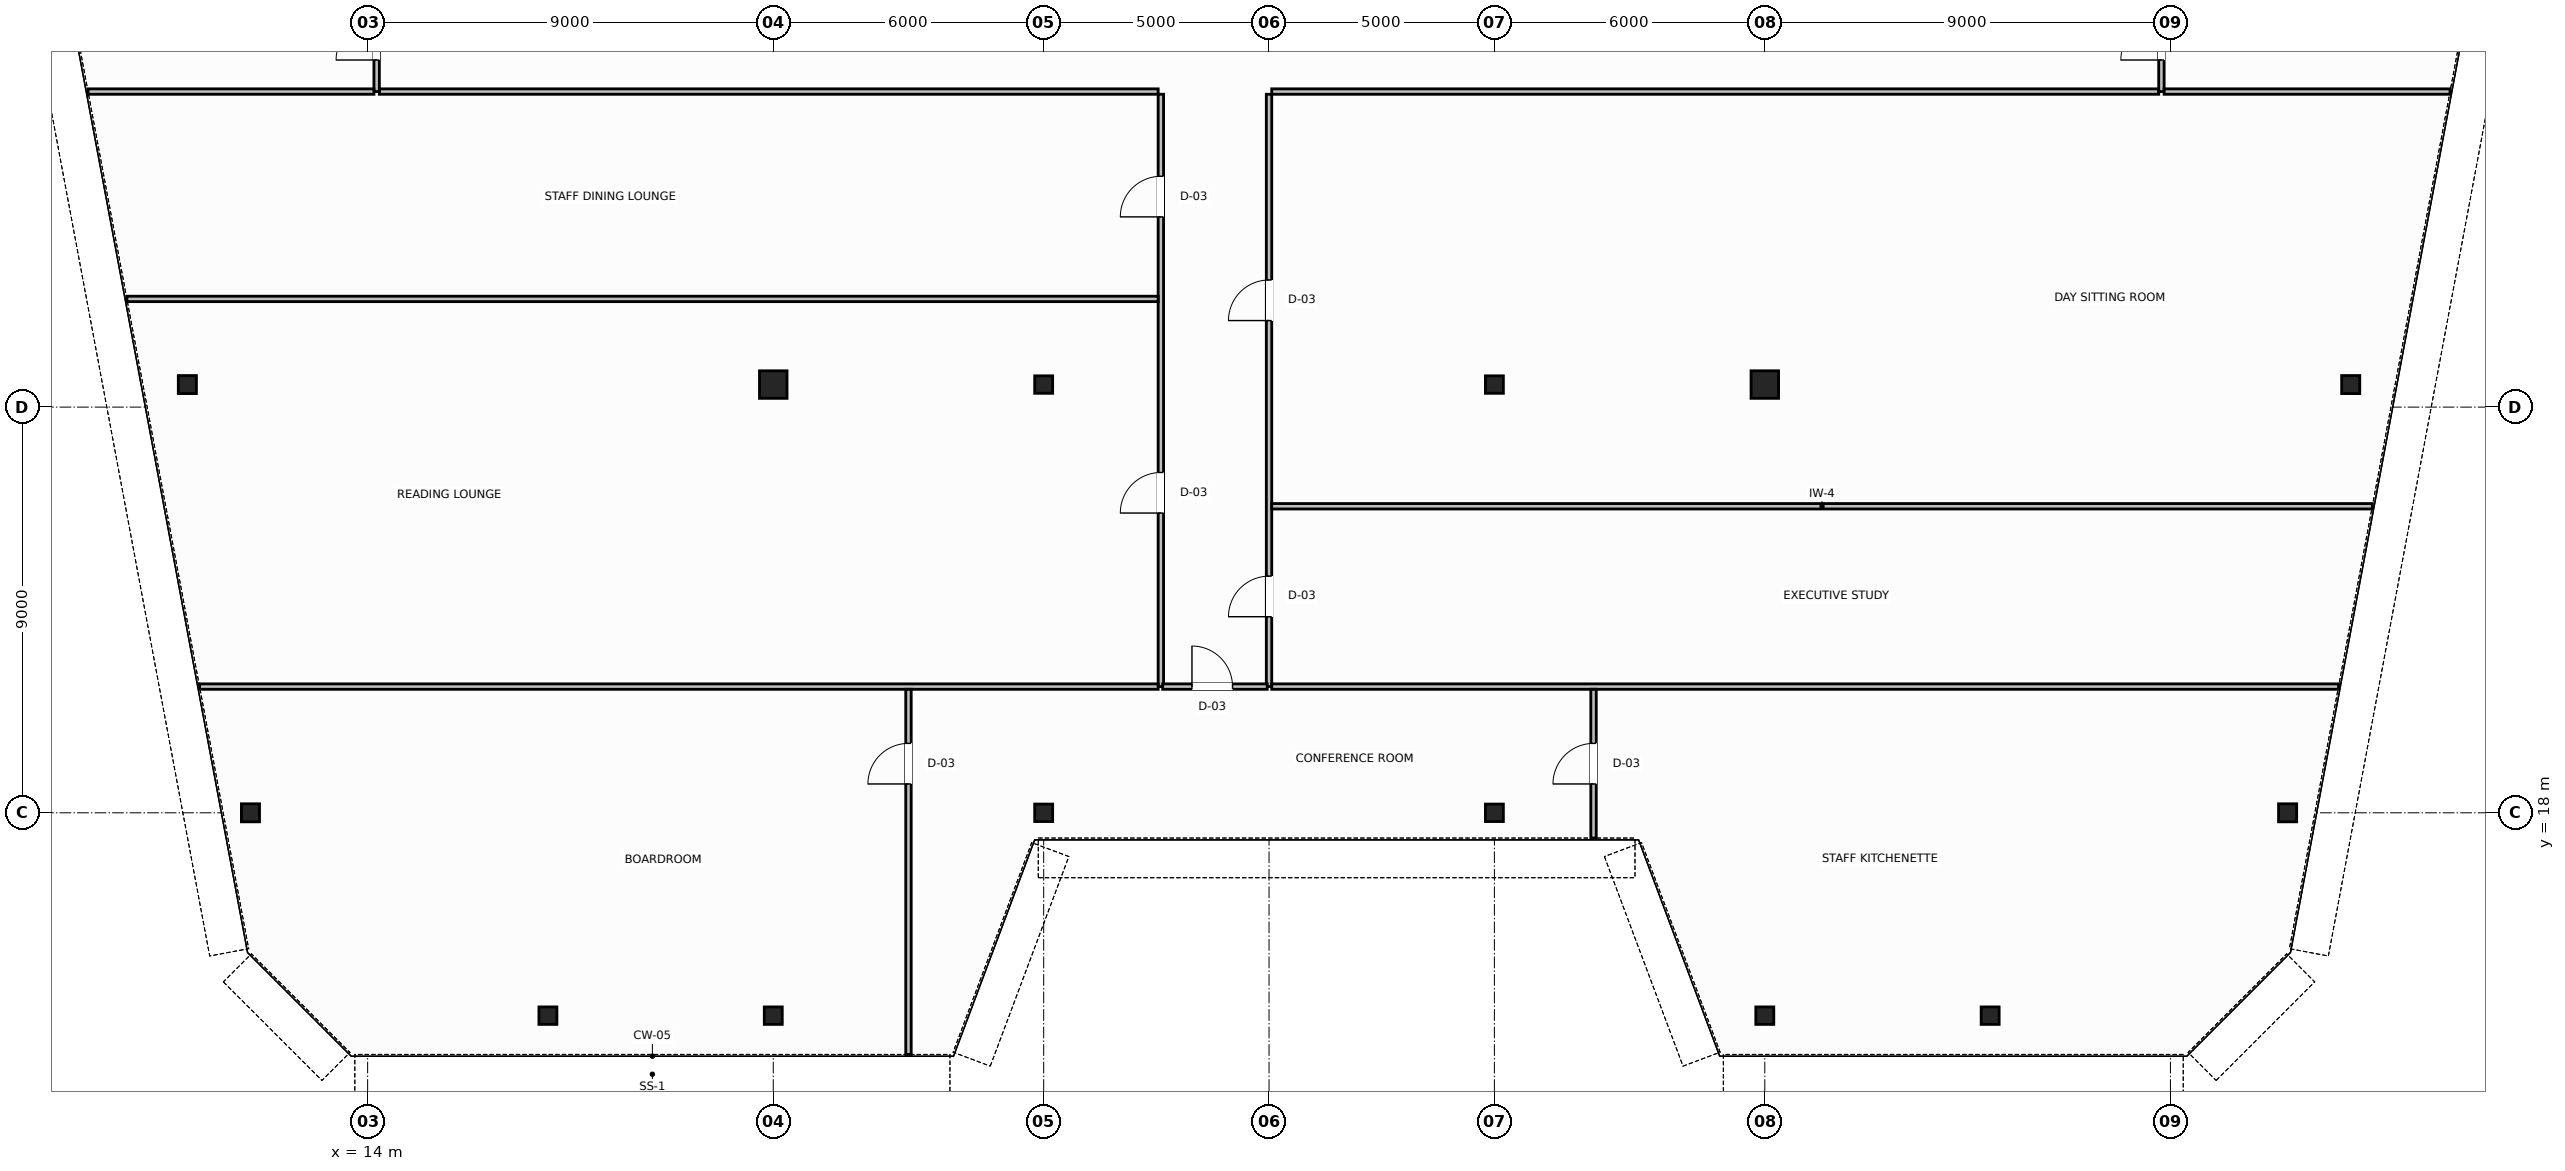
"""IFC4 building model, lengths in metres.
Left out: names, types, materials, properties, quantities, classifications, styles, units other than length and angle.
Written with IfcOpenShell. Run it as: python <this file> out.ifc"""

import sys

from ifc_helpers import new_model, si_unit, direction, frame, frame_2d, origin, origin_2d, place, context, subcontext, project, spatial, rectangle, hollow_circle, i_section, extrude, source, transform, mapped, element, fill, save


model = new_model("IFC4")
c1 = context("Model", 3, precision=1e-05, world=origin(), true_north=direction((0.0, 1.0)))
c2 = subcontext(c1, "Body", "Model", "MODEL_VIEW")
j1 = project(units=[si_unit("LENGTHUNIT", "METRE"), si_unit("PLANEANGLEUNIT", "RADIAN")], contexts=[c1])
p1 = place(None, origin())
s1 = spatial("IfcSite", under=j1, at=p1, CompositionType="ELEMENT")
p2 = place(p1, origin())
s2 = spatial("IfcBuilding", under=s1, at=p2, CompositionType="ELEMENT")
p3 = place(p2, frame((0.0, 0.0, 276.4)))
s3 = spatial("IfcBuildingStorey", under=s2, at=p3, CompositionType="ELEMENT", Elevation=276.4)
m1 = source(origin(), c2, "Body", "SweptSolid", [
    extrude(i_section(OverallWidth=0.401, OverallDepth=0.399, WebThickness=0.025, FlangeThickness=0.035, FilletRadius=0.015, at=origin_2d()), origin(), (0.0, 0.0, 1.0), 3.8),
])
for number, where, z_axis, x_axis in (
    (1, (10.0, 27.5, 0.0), (0.0, 0.0, 1.0), (1.0, 0.0, 0.0)),
    (2, (11.4, 18.0, 0.0), (0.0, 0.0, 1.0), (1.0, 0.0, 0.0)),
    (3, (58.0, 27.5, 0.0), (0.0, 0.0, 1.0), (1.0, 0.0, 0.0)),
    (4, (56.6, 18.0, 0.0), (0.0, 0.0, 1.0), (1.0, 0.0, 0.0)),
):
    element("IfcColumn", number, at=place(p3, frame(where, z_axis=z_axis, x_axis=x_axis)), inside=s3, PredefinedType="COLUMN", context=c2, shape_type="MappedRepresentation", body=[
        mapped(m1, transform((0.0, 0.0, 0.0), scale=1.0)),
    ])
m2 = source(origin(), c2, "Body", "SweptSolid", [
    extrude(hollow_circle(Radius=0.305, WallThickness=0.03, at=origin_2d()), origin(), (0.0, 0.0, 1.0), 3.8),
])
p4 = place(p3, frame((23.0, 27.5, 0.0), z_axis=(0.0, 0.0, 1.0), x_axis=(1.0, 0.0, 0.0)))
e5 = element("IfcColumn", 5, at=p4, inside=s3, PredefinedType="COLUMN", context=c2, shape_type="MappedRepresentation", body=[
    mapped(m2, transform((0.0, 0.0, 0.0), scale=1.0)),
])
m3 = source(origin(), c2, "Body", "SweptSolid", [
    extrude(i_section(OverallWidth=0.398, OverallDepth=0.387, WebThickness=0.021, FlangeThickness=0.029, FilletRadius=0.015, at=origin_2d()), origin(), (0.0, 0.0, 1.0), 3.8),
])
for number, where, z_axis, x_axis in (
    (6, (29.0, 27.5, 0.0), (0.0, 0.0, 1.0), (1.0, 0.0, 0.0)),
    (7, (39.0, 27.5, 0.0), (0.0, 0.0, 1.0), (1.0, 0.0, 0.0)),
):
    element("IfcColumn", number, at=place(p3, frame(where, z_axis=z_axis, x_axis=x_axis)), inside=s3, PredefinedType="COLUMN", context=c2, shape_type="MappedRepresentation", body=[
        mapped(m3, transform((0.0, 0.0, 0.0), scale=1.0)),
    ])
p5 = place(p3, frame((45.0, 27.5, 0.0), z_axis=(0.0, 0.0, 1.0), x_axis=(1.0, 0.0, 0.0)))
e8 = element("IfcColumn", 8, at=p5, inside=s3, PredefinedType="COLUMN", context=c2, shape_type="MappedRepresentation", body=[
    mapped(m2, transform((0.0, 0.0, 0.0), scale=1.0)),
])
for number, where, z_axis, x_axis in (
    (9, (18.0, 13.5, 0.0), (0.0, 0.0, 1.0), (1.0, 0.0, 0.0)),
    (10, (23.0, 13.5, 0.0), (0.0, 0.0, 1.0), (1.0, 0.0, 0.0)),
    (11, (29.0, 18.0, 0.0), (0.0, 0.0, 1.0), (1.0, 0.0, 0.0)),
    (12, (39.0, 18.0, 0.0), (0.0, 0.0, 1.0), (1.0, 0.0, 0.0)),
    (13, (45.0, 13.5, 0.0), (0.0, 0.0, 1.0), (1.0, 0.0, 0.0)),
    (14, (50.0, 13.5, 0.0), (0.0, 0.0, 1.0), (1.0, 0.0, 0.0)),
):
    element("IfcColumn", number, at=place(p3, frame(where, z_axis=z_axis, x_axis=x_axis)), inside=s3, PredefinedType="COLUMN", context=c2, shape_type="MappedRepresentation", body=[
        mapped(m3, transform((0.0, 0.0, 0.0), scale=1.0)),
    ])
p6 = place(p3, frame((14.26, 34.0, 0.0), z_axis=(0.0, 0.0, 1.0), x_axis=(1.0, 0.0, 0.0)))
e15 = element("IfcWall", 15, at=p6, inside=s3, PredefinedType="PARTITIONING", context=c2, shape_type="SweptSolid", body=[
    extrude(rectangle(XDim=17.28, YDim=0.12, at=frame_2d((8.64, 0.0))), origin(), (0.0, 0.0, 1.0), 3.21),
])
p7 = place(p3, frame((34.06, 34.0, 0.0), z_axis=(0.0, 0.0, 1.0), x_axis=(1.0, 0.0, 0.0)))
e16 = element("IfcWall", 16, at=p7, inside=s3, PredefinedType="PARTITIONING", context=c2, shape_type="SweptSolid", body=[
    extrude(rectangle(XDim=19.68, YDim=0.12, at=frame_2d((9.84, 0.0))), origin(), (0.0, 0.0, 1.0), 3.21),
])
p8 = place(p3, frame((14.2, 34.0, 0.0), z_axis=(0.0, 0.0, 1.0), x_axis=(0.0, 1.0, 0.0)))
e17 = element("IfcWall", 17, at=p8, inside=s3, PredefinedType="PARTITIONING", context=c2, shape_type="SweptSolid", body=[
    extrude(rectangle(XDim=2.44, YDim=0.12, at=frame_2d((1.22, 0.0))), origin(), (0.0, 0.0, 1.0), 3.58),
])
p9 = place(p8, frame((0.7, 0.0, 0.0)))
e18 = element("IfcOpeningElement", 18, at=p9, cuts=e17, PredefinedType="OPENING", context=c2, shape_type="SweptSolid", body=[
    extrude(rectangle(XDim=0.9, YDim=2.15, at=frame_2d((0.45, 1.075))), frame((0.0, 0.07, 0.0), z_axis=(0.0, -1.0, 0.0), x_axis=(1.0, 0.0, 0.0)), (0.0, 0.0, 1.0), 0.14),
])
p10 = place(p3, frame((53.8, 34.0, 0.0), z_axis=(0.0, 0.0, 1.0), x_axis=(0.0, 1.0, 0.0)))
e19 = element("IfcWall", 19, at=p10, inside=s3, PredefinedType="PARTITIONING", context=c2, shape_type="SweptSolid", body=[
    extrude(rectangle(XDim=2.44, YDim=0.12, at=frame_2d((1.22, 0.0))), origin(), (0.0, 0.0, 1.0), 3.58),
])
p11 = place(p10, frame((0.7, 0.0, 0.0)))
e20 = element("IfcOpeningElement", 20, at=p11, cuts=e19, PredefinedType="OPENING", context=c2, shape_type="SweptSolid", body=[
    extrude(rectangle(XDim=0.9, YDim=2.15, at=frame_2d((0.45, 1.075))), frame((0.0, 0.07, 0.0), z_axis=(0.0, -1.0, 0.0), x_axis=(1.0, 0.0, 0.0)), (0.0, 0.0, 1.0), 0.14),
])
p12 = place(p3, frame((31.6, 20.8, 0.0), z_axis=(0.0, 0.0, 1.0), x_axis=(0.0, 1.0, 0.0)))
e21 = element("IfcWall", 21, at=p12, inside=s3, PredefinedType="PARTITIONING", context=c2, shape_type="SweptSolid", body=[
    extrude(rectangle(XDim=13.14, YDim=0.12, at=frame_2d((6.57, 0.0))), origin(), (0.0, 0.0, 1.0), 3.58),
])
p13 = place(p12, frame((3.85, 0.0, 0.0)))
e22 = element("IfcOpeningElement", 22, at=p13, cuts=e21, PredefinedType="OPENING", context=c2, shape_type="SweptSolid", body=[
    extrude(rectangle(XDim=0.9, YDim=2.15, at=frame_2d((0.45, 1.075))), frame((0.0, 0.07, 0.0), z_axis=(0.0, -1.0, 0.0), x_axis=(1.0, 0.0, 0.0)), (0.0, 0.0, 1.0), 0.14),
])
p14 = place(p12, frame((10.42, 0.0, 0.0)))
e23 = element("IfcOpeningElement", 23, at=p14, cuts=e21, PredefinedType="OPENING", context=c2, shape_type="SweptSolid", body=[
    extrude(rectangle(XDim=0.9, YDim=2.15, at=frame_2d((0.45, 1.075))), frame((0.0, 0.07, 0.0), z_axis=(0.0, -1.0, 0.0), x_axis=(1.0, 0.0, 0.0)), (0.0, 0.0, 1.0), 0.14),
])
p15 = place(p3, frame((34.0, 20.8, 0.0), z_axis=(0.0, 0.0, 1.0), x_axis=(0.0, 1.0, 0.0)))
e24 = element("IfcWall", 24, at=p15, inside=s3, PredefinedType="PARTITIONING", context=c2, shape_type="SweptSolid", body=[
    extrude(rectangle(XDim=13.14, YDim=0.12, at=frame_2d((6.57, 0.0))), origin(), (0.0, 0.0, 1.0), 3.58),
])
p16 = place(p15, frame((1.55, 0.0, 0.0)))
e25 = element("IfcOpeningElement", 25, at=p16, cuts=e24, PredefinedType="OPENING", context=c2, shape_type="SweptSolid", body=[
    extrude(rectangle(XDim=0.9, YDim=2.15, at=frame_2d((0.45, 1.075))), frame((0.0, 0.07, 0.0), z_axis=(0.0, -1.0, 0.0), x_axis=(1.0, 0.0, 0.0)), (0.0, 0.0, 1.0), 0.14),
])
p17 = place(p15, frame((8.12, 0.0, 0.0)))
e26 = element("IfcOpeningElement", 26, at=p17, cuts=e24, PredefinedType="OPENING", context=c2, shape_type="SweptSolid", body=[
    extrude(rectangle(XDim=0.9, YDim=2.15, at=frame_2d((0.45, 1.075))), frame((0.0, 0.07, 0.0), z_axis=(0.0, -1.0, 0.0), x_axis=(1.0, 0.0, 0.0)), (0.0, 0.0, 1.0), 0.14),
])
p18 = place(p3, frame((31.64, 20.8, 0.0), z_axis=(0.0, 0.0, 1.0), x_axis=(1.0, 0.0, 0.0)))
e27 = element("IfcWall", 27, at=p18, inside=s3, PredefinedType="PARTITIONING", context=c2, shape_type="SweptSolid", body=[
    extrude(rectangle(XDim=2.32, YDim=0.12, at=frame_2d((1.16, 0.0))), origin(), (0.0, 0.0, 1.0), 3.58),
])
p19 = place(p18, frame((0.65, 0.0, 0.0)))
e28 = element("IfcOpeningElement", 28, at=p19, cuts=e27, PredefinedType="OPENING", context=c2, shape_type="SweptSolid", body=[
    extrude(rectangle(XDim=0.9, YDim=2.15, at=frame_2d((0.45, 1.075))), frame((0.0, 0.07, 0.0), z_axis=(0.0, -1.0, 0.0), x_axis=(1.0, 0.0, 0.0)), (0.0, 0.0, 1.0), 0.14),
])
for number, where, z_axis, x_axis in (
    (29, (7.796, 34.0, 0.0), (0.0, 0.0, 1.0), (1.0, 0.0, 0.0)),
    (30, (53.86, 34.0, 0.0), (0.0, 0.0, 1.0), (1.0, 0.0, 0.0)),
):
    element("IfcWall", number, at=place(p3, frame(where, z_axis=z_axis, x_axis=x_axis)), inside=s3, PredefinedType="PARTITIONING", context=c2, shape_type="SweptSolid", body=[
        extrude(rectangle(XDim=6.344, YDim=0.12, at=frame_2d((3.172, 0.0))), origin(), (0.0, 0.0, 1.0), 3.21),
    ])
p20 = place(p3, frame((8.658, 29.4, 0.0), z_axis=(0.0, 0.0, 1.0), x_axis=(1.0, 0.0, 0.0)))
e31 = element("IfcWall", 31, at=p20, inside=s3, PredefinedType="PARTITIONING", context=c2, shape_type="SweptSolid", body=[
    extrude(rectangle(XDim=22.882, YDim=0.12, at=frame_2d((11.441, 0.0))), origin(), (0.0, 0.0, 1.0), 3.58),
])
p21 = place(p3, frame((34.06, 24.8, 0.0), z_axis=(0.0, 0.0, 1.0), x_axis=(1.0, 0.0, 0.0)))
e32 = element("IfcWall", 32, at=p21, inside=s3, PredefinedType="PARTITIONING", context=c2, shape_type="SweptSolid", body=[
    extrude(rectangle(XDim=24.42, YDim=0.12, at=frame_2d((12.21, 0.0))), origin(), (0.0, 0.0, 1.0), 3.21),
])
p22 = place(p3, frame((10.27, 20.8, 0.0), z_axis=(0.0, 0.0, 1.0), x_axis=(1.0, 0.0, 0.0)))
e33 = element("IfcWall", 33, at=p22, inside=s3, PredefinedType="PARTITIONING", context=c2, shape_type="SweptSolid", body=[
    extrude(rectangle(XDim=21.27, YDim=0.12, at=frame_2d((10.635, 0.0))), origin(), (0.0, 0.0, 1.0), 3.58),
])
p23 = place(p3, frame((34.06, 20.8, 0.0), z_axis=(0.0, 0.0, 1.0), x_axis=(1.0, 0.0, 0.0)))
e34 = element("IfcWall", 34, at=p23, inside=s3, PredefinedType="PARTITIONING", context=c2, shape_type="SweptSolid", body=[
    extrude(rectangle(XDim=23.67, YDim=0.12, at=frame_2d((11.835, 0.0))), origin(), (0.0, 0.0, 1.0), 3.58),
])
p24 = place(p3, frame((26.0, 12.64, 0.0), z_axis=(0.0, 0.0, 1.0), x_axis=(0.0, 1.0, 0.0)))
e35 = element("IfcWall", 35, at=p24, inside=s3, PredefinedType="PARTITIONING", context=c2, shape_type="SweptSolid", body=[
    extrude(rectangle(XDim=8.1, YDim=0.12, at=frame_2d((4.05, 0.0))), origin(), (0.0, 0.0, 1.0), 3.58),
])
p25 = place(p24, frame((6.0, 0.0, 0.0)))
e36 = element("IfcOpeningElement", 36, at=p25, cuts=e35, PredefinedType="OPENING", context=c2, shape_type="SweptSolid", body=[
    extrude(rectangle(XDim=0.9, YDim=2.15, at=frame_2d((0.45, 1.075))), frame((0.0, 0.07, 0.0), z_axis=(0.0, -1.0, 0.0), x_axis=(1.0, 0.0, 0.0)), (0.0, 0.0, 1.0), 0.14),
])
p26 = place(p3, frame((41.2, 17.44, 0.0), z_axis=(0.0, 0.0, 1.0), x_axis=(0.0, 1.0, 0.0)))
e37 = element("IfcWall", 37, at=p26, inside=s3, PredefinedType="PARTITIONING", context=c2, shape_type="SweptSolid", body=[
    extrude(rectangle(XDim=3.3, YDim=0.12, at=frame_2d((1.65, 0.0))), origin(), (0.0, 0.0, 1.0), 3.58),
])
p27 = place(p26, frame((1.2, 0.0, 0.0)))
e38 = element("IfcOpeningElement", 38, at=p27, cuts=e37, PredefinedType="OPENING", context=c2, shape_type="SweptSolid", body=[
    extrude(rectangle(XDim=0.9, YDim=2.15, at=frame_2d((0.45, 1.075))), frame((0.0, 0.07, 0.0), z_axis=(0.0, -1.0, 0.0), x_axis=(1.0, 0.0, 0.0)), (0.0, 0.0, 1.0), 0.14),
])
m4 = source(origin(), c2, "Body", "SweptSolid", [
    extrude(rectangle(XDim=0.9, YDim=2.15, at=frame_2d((0.45, 1.075))), frame((0.0, 0.025, 0.0), z_axis=(0.0, -1.0, 0.0), x_axis=(1.0, 0.0, 0.0)), (0.0, 0.0, 1.0), 0.05),
])
p28 = place(p9, origin())
e39 = element("IfcDoor", 39, at=p28, inside=s3, OperationType="SINGLE_SWING_LEFT", PredefinedType="DOOR", context=c2, shape_type="MappedRepresentation", body=[
    mapped(m4, transform((0.0, 0.0, 0.0), scale=1.0)),
])
fill(e18, e39)
p29 = place(p11, origin())
e40 = element("IfcDoor", 40, at=p29, inside=s3, OperationType="SINGLE_SWING_RIGHT", PredefinedType="DOOR", context=c2, shape_type="MappedRepresentation", body=[
    mapped(m4, transform((0.0, 0.0, 0.0), scale=1.0)),
])
fill(e20, e40)
p30 = place(p13, origin())
e41 = element("IfcDoor", 41, at=p30, inside=s3, OperationType="SINGLE_SWING_LEFT", PredefinedType="DOOR", context=c2, shape_type="MappedRepresentation", body=[
    mapped(m4, transform((0.0, 0.0, 0.0), scale=1.0)),
])
fill(e22, e41)
p31 = place(p14, origin())
e42 = element("IfcDoor", 42, at=p31, inside=s3, OperationType="SINGLE_SWING_RIGHT", PredefinedType="DOOR", context=c2, shape_type="MappedRepresentation", body=[
    mapped(m4, transform((0.0, 0.0, 0.0), scale=1.0)),
])
fill(e23, e42)
p32 = place(p16, origin())
e43 = element("IfcDoor", 43, at=p32, inside=s3, OperationType="SINGLE_SWING_RIGHT", PredefinedType="DOOR", context=c2, shape_type="MappedRepresentation", body=[
    mapped(m4, transform((0.0, 0.0, 0.0), scale=1.0)),
])
fill(e25, e43)
p33 = place(p17, origin())
e44 = element("IfcDoor", 44, at=p33, inside=s3, OperationType="SINGLE_SWING_LEFT", PredefinedType="DOOR", context=c2, shape_type="MappedRepresentation", body=[
    mapped(m4, transform((0.0, 0.0, 0.0), scale=1.0)),
])
fill(e26, e44)
p34 = place(p25, origin())
e45 = element("IfcDoor", 45, at=p34, inside=s3, OperationType="SINGLE_SWING_RIGHT", PredefinedType="DOOR", context=c2, shape_type="MappedRepresentation", body=[
    mapped(m4, transform((0.0, 0.0, 0.0), scale=1.0)),
])
fill(e36, e45)
p35 = place(p19, origin())
e46 = element("IfcDoor", 46, at=p35, inside=s3, OperationType="SINGLE_SWING_LEFT", PredefinedType="DOOR", context=c2, shape_type="MappedRepresentation", body=[
    mapped(m4, transform((0.0, 0.0, 0.0), scale=1.0)),
])
fill(e28, e46)
p36 = place(p27, origin())
e47 = element("IfcDoor", 47, at=p36, inside=s3, OperationType="SINGLE_SWING_LEFT", PredefinedType="DOOR", context=c2, shape_type="MappedRepresentation", body=[
    mapped(m4, transform((0.0, 0.0, 0.0), scale=1.0)),
])
fill(e38, e47)
save(model, sys.argv[1])
